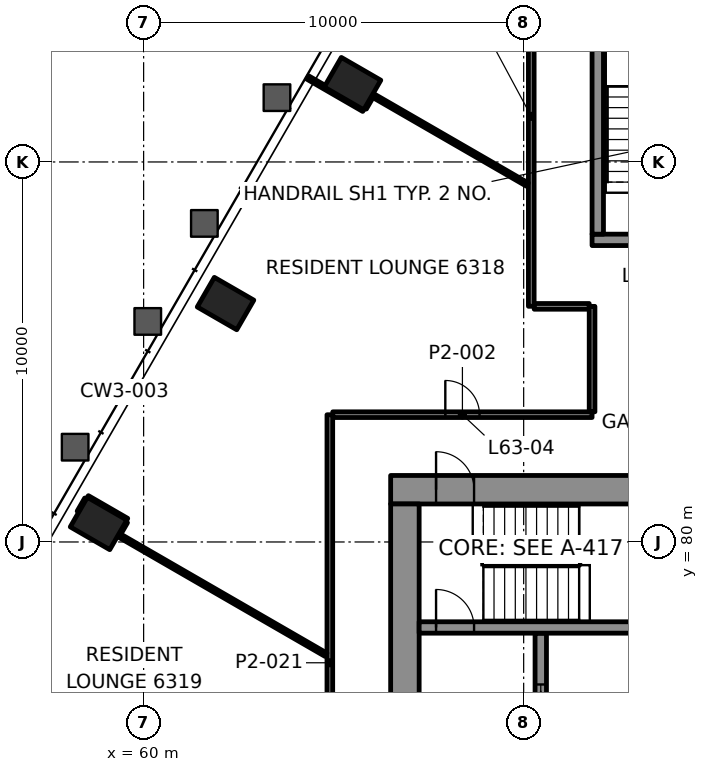
"""IFC4 building model, lengths in metres.
Left out: names, types, materials, properties, quantities, classifications, styles, units other than length and angle.
Written with IfcOpenShell. Run it as: python <this file> out.ifc"""

import sys

from ifc_helpers import new_model, si_unit, direction, frame, frame_2d, origin, origin_2d, place, context, subcontext, project, spatial, rectangle, hollow_rectangle, extrude, element, fill, save


model = new_model("IFC4")
c1 = context("Model", 3, precision=1e-05, world=origin(), true_north=direction((0.0, 1.0)))
c2 = subcontext(c1, "Body", "Model", "MODEL_VIEW")
j1 = project(units=[si_unit("LENGTHUNIT", "METRE"), si_unit("PLANEANGLEUNIT", "RADIAN")], contexts=[c1])
p1 = place(None, origin())
s1 = spatial("IfcSite", under=j1, at=p1, CompositionType="ELEMENT")
p2 = place(p1, origin())
s2 = spatial("IfcBuilding", under=s1, at=p2, CompositionType="ELEMENT")
p3 = place(p2, frame((0.0, 0.0, 267.1)))
s3 = spatial("IfcBuildingStorey", under=s2, at=p3, CompositionType="ELEMENT", Elevation=267.1)
for number, where, z_axis, x_axis in (
    (1, (65.497, 92.062, -0.0), (0.0, 0.0, 1.0), (-0.5, -0.866, 0.0)),
    (2, (62.156, 86.274, -0.0), (0.0, 0.0, 1.0), (-0.5, -0.866, 0.0)),
    (3, (58.814, 80.487, -0.0), (0.0, 0.0, 1.0), (-0.5, -0.866, 0.0)),
):
    element("IfcColumn", number, at=place(p3, frame(where, z_axis=z_axis, x_axis=x_axis)), inside=s3, PredefinedType="COLUMN", context=c2, shape_type="SweptSolid", body=[
        extrude(hollow_rectangle(XDim=0.9, YDim=1.2, WallThickness=0.06, at=origin_2d()), origin(), (0.0, 0.0, 1.0), 3.5),
    ])
p4 = place(p3, frame((66.5, 81.375, 0.0), z_axis=(0.0, 0.0, 1.0), x_axis=(1.0, 0.0, 0.0)))
e4 = element("IfcWall", 4, at=p4, inside=s3, PredefinedType="SHEAR", context=c2, shape_type="SweptSolid", body=[
    extrude(rectangle(XDim=17.0, YDim=0.75, at=frame_2d((8.5, 0.0))), origin(), (0.0, 0.0, 1.0), 3.3),
])
p5 = place(p4, frame((1.195, 0.0, 0.0)))
e5 = element("IfcOpeningElement", 5, at=p5, cuts=e4, PredefinedType="OPENING", context=c2, shape_type="SweptSolid", body=[
    extrude(rectangle(XDim=1.0, YDim=2.1, at=frame_2d((0.5, 1.05))), frame((0.0, 0.385, 0.0), z_axis=(0.0, -1.0, 0.0), x_axis=(1.0, 0.0, 0.0)), (0.0, 0.0, 1.0), 0.77),
])
p6 = place(p4, frame((15.005, 0.0, 0.0)))
e6 = element("IfcOpeningElement", 6, at=p6, cuts=e4, PredefinedType="OPENING", context=c2, shape_type="SweptSolid", body=[
    extrude(rectangle(XDim=1.0, YDim=2.1, at=frame_2d((0.5, 1.05))), frame((0.0, 0.385, 0.0), z_axis=(0.0, -1.0, 0.0), x_axis=(1.0, 0.0, 0.0)), (0.0, 0.0, 1.0), 0.77),
])
p7 = place(p4, frame((8.15, 0.0, 0.0)))
e7 = element("IfcOpeningElement", 7, at=p7, cuts=e4, PredefinedType="OPENING", context=c2, shape_type="SweptSolid", body=[
    extrude(rectangle(XDim=0.9, YDim=2.1, at=frame_2d((0.45, 1.05))), frame((0.0, 0.385, 0.0), z_axis=(0.0, -1.0, 0.0), x_axis=(1.0, 0.0, 0.0)), (0.0, 0.0, 1.0), 0.77),
])
p8 = place(p3, frame((66.875, 69.0, 0.0), z_axis=(0.0, 0.0, 1.0), x_axis=(0.0, 1.0, 0.0)))
e8 = element("IfcWall", 8, at=p8, inside=s3, PredefinedType="SHEAR", context=c2, shape_type="SweptSolid", body=[
    extrude(rectangle(XDim=12.0, YDim=0.75, at=frame_2d((6.0, 0.0))), origin(), (0.0, 0.0, 1.0), 3.3),
])
p9 = place(p8, frame((3.7, 0.0, 0.0)))
e9 = element("IfcOpeningElement", 9, at=p9, cuts=e8, PredefinedType="OPENING", context=c2, shape_type="SweptSolid", body=[
    extrude(rectangle(XDim=1.2, YDim=2.1, at=frame_2d((0.6, 1.05))), frame((0.0, 0.385, 0.0), z_axis=(0.0, -1.0, 0.0), x_axis=(1.0, 0.0, 0.0)), (0.0, 0.0, 1.0), 0.77),
])
p10 = place(p8, frame((0.925, 0.0, 0.0)))
e10 = element("IfcOpeningElement", 10, at=p10, cuts=e8, PredefinedType="OPENING", context=c2, shape_type="SweptSolid", body=[
    extrude(rectangle(XDim=0.9, YDim=2.1, at=frame_2d((0.45, 1.05))), frame((0.0, 0.385, 0.0), z_axis=(0.0, -1.0, 0.0), x_axis=(1.0, 0.0, 0.0)), (0.0, 0.0, 1.0), 0.77),
])
p11 = place(p3, frame((70.45, 75.0, 0.0), z_axis=(0.0, 0.0, 1.0), x_axis=(0.0, 1.0, 0.0)))
e11 = element("IfcWall", 11, at=p11, inside=s3, PredefinedType="SHEAR", context=c2, shape_type="SweptSolid", body=[
    extrude(rectangle(XDim=2.6, YDim=0.3, at=frame_2d((1.3, 0.0))), origin(), (0.0, 0.0, 1.0), 3.3),
])
p12 = place(p11, frame((0.15, 0.0, 0.0)))
e12 = element("IfcOpeningElement", 12, at=p12, cuts=e11, PredefinedType="OPENING", context=c2, shape_type="SweptSolid", body=[
    extrude(rectangle(XDim=1.1, YDim=2.1, at=frame_2d((0.55, 1.05))), frame((0.0, 0.16, 0.0), z_axis=(0.0, -1.0, 0.0), x_axis=(1.0, 0.0, 0.0)), (0.0, 0.0, 1.0), 0.32),
])
p13 = place(p3, frame((67.25, 77.75, 0.0), z_axis=(0.0, 0.0, 1.0), x_axis=(1.0, 0.0, 0.0)))
e13 = element("IfcWall", 13, at=p13, inside=s3, PredefinedType="SHEAR", context=c2, shape_type="SweptSolid", body=[
    extrude(rectangle(XDim=15.5, YDim=0.3, at=frame_2d((7.75, 0.0))), origin(), (0.0, 0.0, 1.0), 3.3),
])
p14 = place(p13, frame((0.445, 0.0, 0.0)))
e14 = element("IfcOpeningElement", 14, at=p14, cuts=e13, PredefinedType="OPENING", context=c2, shape_type="SweptSolid", body=[
    extrude(rectangle(XDim=1.0, YDim=2.1, at=frame_2d((0.5, 1.05))), frame((0.0, 0.16, 0.0), z_axis=(0.0, -1.0, 0.0), x_axis=(1.0, 0.0, 0.0)), (0.0, 0.0, 1.0), 0.32),
])
p15 = place(p3, frame((71.8, 87.95, 0.0), z_axis=(0.0, 0.0, 1.0), x_axis=(1.0, 0.0, 0.0)))
e15 = element("IfcWall", 15, at=p15, inside=s3, PredefinedType="SHEAR", context=c2, shape_type="SweptSolid", body=[
    extrude(rectangle(XDim=6.4, YDim=0.3, at=frame_2d((3.2, 0.0))), origin(), (0.0, 0.0, 1.0), 3.3),
])
p16 = place(p15, frame((1.325, 0.0, 0.0)))
e16 = element("IfcOpeningElement", 16, at=p16, cuts=e15, PredefinedType="OPENING", context=c2, shape_type="SweptSolid", body=[
    extrude(rectangle(XDim=1.0, YDim=2.1, at=frame_2d((0.5, 1.05))), frame((0.0, 0.16, 0.0), z_axis=(0.0, -1.0, 0.0), x_axis=(1.0, 0.0, 0.0)), (0.0, 0.0, 1.0), 0.32),
])
p17 = place(p15, frame((4.125, 0.0, 0.0)))
e17 = element("IfcOpeningElement", 17, at=p17, cuts=e15, PredefinedType="OPENING", context=c2, shape_type="SweptSolid", body=[
    extrude(rectangle(XDim=1.2, YDim=2.1, at=frame_2d((0.6, 1.05))), frame((0.0, 0.16, 0.0), z_axis=(0.0, -1.0, 0.0), x_axis=(1.0, 0.0, 0.0)), (0.0, 0.0, 1.0), 0.32),
])
p18 = place(p3, frame((71.95, 88.1, 0.0), z_axis=(0.0, 0.0, 1.0), x_axis=(0.0, 1.0, 0.0)))
e18 = element("IfcWall", 18, at=p18, inside=s3, PredefinedType="SHEAR", context=c2, shape_type="SweptSolid", body=[
    extrude(rectangle(XDim=6.2, YDim=0.3, at=frame_2d((3.1, 0.0))), origin(), (0.0, 0.0, 1.0), 3.3),
])
p19 = place(p3, frame((64.977, 83.35, 0.0), z_axis=(0.0, 0.0, 1.0), x_axis=(1.0, 0.0, 0.0)))
e19 = element("IfcWall", 19, at=p19, inside=s3, PredefinedType="PARTITIONING", context=c2, shape_type="SweptSolid", body=[
    extrude(rectangle(XDim=6.823, YDim=0.15, at=frame_2d((3.412, 0.0))), origin(), (0.0, 0.0, 1.0), 2.7),
])
p20 = place(p19, frame((2.961, 0.0, 0.0)))
e20 = element("IfcOpeningElement", 20, at=p20, cuts=e19, PredefinedType="OPENING", context=c2, shape_type="SweptSolid", body=[
    extrude(rectangle(XDim=0.9, YDim=2.1, at=frame_2d((0.45, 1.05))), frame((0.0, 0.085, 0.0), z_axis=(0.0, -1.0, 0.0), x_axis=(1.0, 0.0, 0.0)), (0.0, 0.0, 1.0), 0.17),
])
p21 = place(p3, frame((70.277, 86.2, 0.0), z_axis=(0.0, 0.0, 1.0), x_axis=(1.0, 0.0, 0.0)))
e21 = element("IfcWall", 21, at=p21, inside=s3, PredefinedType="PARTITIONING", context=c2, shape_type="SweptSolid", body=[
    extrude(rectangle(XDim=1.448, YDim=0.15, at=frame_2d((0.724, 0.0))), origin(), (0.0, 0.0, 1.0), 2.7),
])
p22 = place(p3, frame((59.359, 80.23, 0.0), z_axis=(0.0, 0.0, 1.0), x_axis=(0.499539972301, 0.866290838041, 0.0)))
e22 = element("IfcWall", 22, at=p22, inside=s3, PredefinedType="PARTITIONING", context=c2, shape_type="SweptSolid", body=[
    extrude(rectangle(XDim=0.347, YDim=0.1, at=frame_2d((0.174, 0.0))), origin(), (0.0, 0.0, 1.0), 2.7),
])
p23 = place(p3, frame((65.817, 91.417, 0.0), z_axis=(0.0, 0.0, 1.0), x_axis=(0.499985493453, 0.866033778982, 0.0)))
e23 = element("IfcWall", 23, at=p23, inside=s3, PredefinedType="PARTITIONING", context=c2, shape_type="SweptSolid", body=[
    extrude(rectangle(XDim=0.348, YDim=0.1, at=frame_2d((0.174, 0.0))), origin(), (0.0, 0.0, 1.0), 2.7),
])
p24 = place(p3, frame((58.294, 80.787, 0.0), z_axis=(0.0, 0.0, 1.0), x_axis=(0.500165123728, 0.865930048564, 0.0)))
e24 = element("IfcWall", 24, at=p24, inside=s3, PredefinedType="PARTITIONING", context=c2, shape_type="SweptSolid", body=[
    extrude(rectangle(XDim=0.398, YDim=0.1, at=frame_2d((0.199, 0.0))), origin(), (0.0, 0.0, 1.0), 2.7),
])
p25 = place(p3, frame((71.8, 83.425, 0.0), z_axis=(0.0, 0.0, 1.0), x_axis=(0.0, 1.0, 0.0)))
e25 = element("IfcWall", 25, at=p25, inside=s3, PredefinedType="PARTITIONING", context=c2, shape_type="SweptSolid", body=[
    extrude(rectangle(XDim=2.775, YDim=0.15, at=frame_2d((1.387, 0.0))), origin(), (0.0, 0.0, 1.0), 2.697),
])
p26 = place(p3, frame((70.2, 86.202, 0.0), z_axis=(0.0, 0.0, 1.0), x_axis=(0.0, 1.0, 0.0)))
e26 = element("IfcWall", 26, at=p26, inside=s3, PredefinedType="PARTITIONING", context=c2, shape_type="SweptSolid", body=[
    extrude(rectangle(XDim=9.998, YDim=0.15, at=frame_2d((4.999, 0.0))), origin(), (0.0, 0.0, 1.0), 2.7),
])
p27 = place(p3, frame((64.9, 70.295, 0.0), z_axis=(0.0, 0.0, 1.0), x_axis=(0.0, 1.0, 0.0)))
e27 = element("IfcWall", 27, at=p27, inside=s3, PredefinedType="PARTITIONING", context=c2, shape_type="SweptSolid", body=[
    extrude(rectangle(XDim=13.053, YDim=0.15, at=frame_2d((6.527, 0.0))), origin(), (0.0, 0.0, 1.0), 2.7),
])
p28 = place(p27, frame((2.963, 0.0, 0.0)))
e28 = element("IfcOpeningElement", 28, at=p28, cuts=e27, PredefinedType="OPENING", context=c2, shape_type="SweptSolid", body=[
    extrude(rectangle(XDim=1.0, YDim=2.1, at=frame_2d((0.5, 1.05))), frame((0.0, 0.085, 0.0), z_axis=(0.0, -1.0, 0.0), x_axis=(1.0, 0.0, 0.0)), (0.0, 0.0, 1.0), 0.17),
])
p29 = place(p3, frame((70.099, 89.404, 0.0), z_axis=(0.0, 0.0, 1.0), x_axis=(-0.866026044032, 0.499998891056, 0.0)))
e29 = element("IfcWall", 29, at=p29, inside=s3, PredefinedType="PARTITIONING", context=c2, shape_type="SweptSolid", body=[
    extrude(rectangle(XDim=4.714, YDim=0.1, at=frame_2d((2.357, 0.0))), origin(), (0.0, 0.0, 1.0), 2.7),
])
p30 = place(p3, frame((65.79, 91.373, 0.0), z_axis=(0.0, 0.0, 1.0), x_axis=(-0.866085039529, 0.499896693632, 0.0)))
e30 = element("IfcWall", 30, at=p30, inside=s3, PredefinedType="PARTITIONING", context=c2, shape_type="SweptSolid", body=[
    extrude(rectangle(XDim=1.698, YDim=0.1, at=frame_2d((0.849, 0.0))), origin(), (0.0, 0.0, 1.0), 2.688),
])
p31 = place(p3, frame((59.557, 80.578, 0.0), z_axis=(0.0, 0.0, 1.0), x_axis=(-0.866035997947, 0.499981649923, 0.0)))
e31 = element("IfcWall", 31, at=p31, inside=s3, PredefinedType="PARTITIONING", context=c2, shape_type="SweptSolid", body=[
    extrude(rectangle(XDim=1.196, YDim=0.1, at=frame_2d((0.598, 0.0))), origin(), (0.0, 0.0, 1.0), 2.688),
])
p32 = place(p3, frame((64.799, 77.032, 0.0), z_axis=(0.0, 0.0, 1.0), x_axis=(-0.866032246126, 0.49998814853, 0.0)))
e32 = element("IfcWall", 32, at=p32, inside=s3, PredefinedType="PARTITIONING", context=c2, shape_type="SweptSolid", body=[
    extrude(rectangle(XDim=6.31, YDim=0.1, at=frame_2d((3.155, 0.0))), origin(), (0.0, 0.0, 1.0), 2.7),
])
p33 = place(p3, frame((64.799, 70.601, 0.0), z_axis=(0.0, 0.0, 1.0), x_axis=(-0.86602224969, 0.500005463012, 0.0)))
e33 = element("IfcWall", 33, at=p33, inside=s3, PredefinedType="PARTITIONING", context=c2, shape_type="SweptSolid", body=[
    extrude(rectangle(XDim=11.226, YDim=0.1, at=frame_2d((5.613, 0.0))), origin(), (0.0, 0.0, 1.0), 2.688),
])
p34 = place(p20, origin())
e34 = element("IfcDoor", 34, at=p34, inside=s3, OperationType="SINGLE_SWING_LEFT", PredefinedType="DOOR", context=c2, shape_type="SweptSolid", body=[
    extrude(rectangle(XDim=0.9, YDim=2.1, at=frame_2d((0.45, 1.05))), frame((0.0, 0.025, 0.0), z_axis=(0.0, -1.0, 0.0), x_axis=(1.0, 0.0, 0.0)), (0.0, 0.0, 1.0), 0.05),
])
fill(e20, e34)
p35 = place(p12, origin())
e35 = element("IfcDoor", 35, at=p35, inside=s3, OperationType="DOUBLE_DOOR_SLIDING", PredefinedType="DOOR", context=c2, shape_type="SweptSolid", body=[
    extrude(rectangle(XDim=1.1, YDim=2.1, at=frame_2d((0.55, 1.05))), frame((0.0, 0.025, 0.0), z_axis=(0.0, -1.0, 0.0), x_axis=(1.0, 0.0, 0.0)), (0.0, 0.0, 1.0), 0.05),
])
fill(e12, e35)
p36 = place(p14, origin())
e36 = element("IfcDoor", 36, at=p36, inside=s3, OperationType="SINGLE_SWING_LEFT", PredefinedType="DOOR", context=c2, shape_type="SweptSolid", body=[
    extrude(rectangle(XDim=1.0, YDim=2.1, at=frame_2d((0.5, 1.05))), frame((0.0, 0.025, 0.0), z_axis=(0.0, -1.0, 0.0), x_axis=(1.0, 0.0, 0.0)), (0.0, 0.0, 1.0), 0.05),
])
fill(e14, e36)
p37 = place(p5, origin())
e37 = element("IfcDoor", 37, at=p37, inside=s3, OperationType="SINGLE_SWING_RIGHT", PredefinedType="DOOR", context=c2, shape_type="SweptSolid", body=[
    extrude(rectangle(XDim=1.0, YDim=2.1, at=frame_2d((0.5, 1.05))), frame((0.0, 0.095, 0.0), z_axis=(0.0, -1.0, 0.0), x_axis=(1.0, 0.0, 0.0)), (0.0, 0.0, 1.0), 0.19),
])
fill(e5, e37)
save(model, sys.argv[1])
